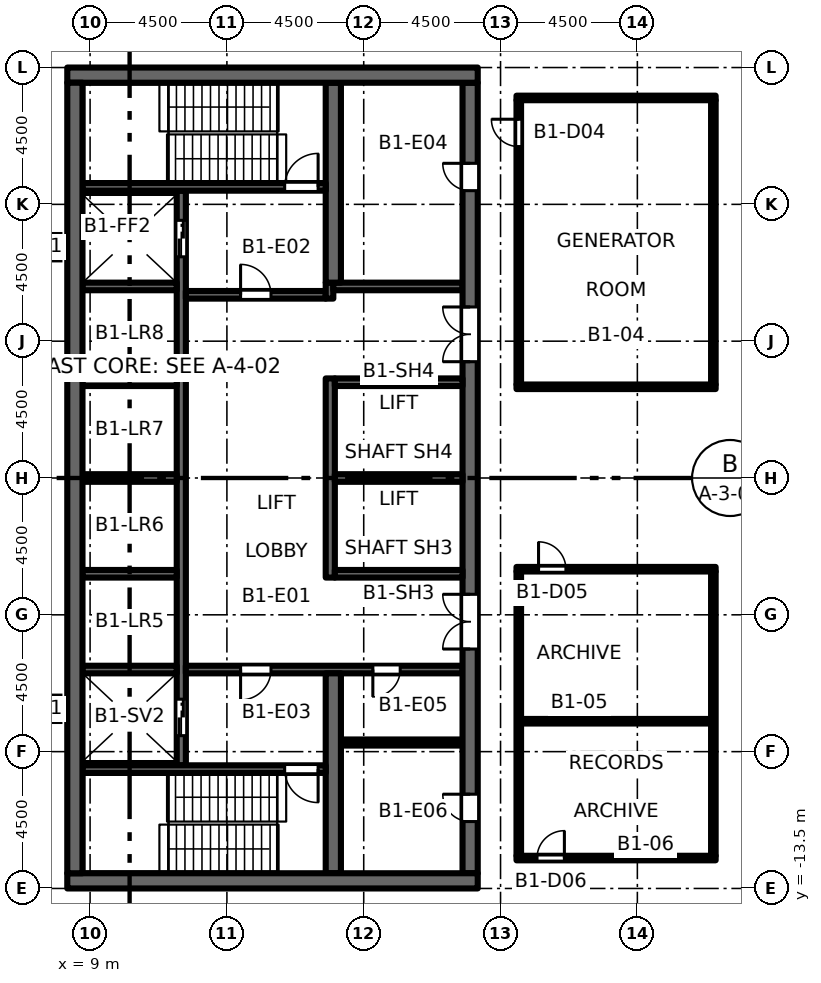
"""IFC4 building model, lengths in metres.
Left out: names, types, materials, properties, quantities, classifications, styles, units other than length and angle.
Written with IfcOpenShell. Run it as: python <this file> out.ifc"""

import sys

from ifc_helpers import new_model, si_unit, direction, frame, frame_2d, origin, origin_2d, place, context, subcontext, project, spatial, rectangle, hollow_rectangle, extrude, element, fill, save


model = new_model("IFC4")
c1 = context("Model", 3, precision=1e-05, world=origin(), true_north=direction((0.0, 1.0)))
c2 = subcontext(c1, "Body", "Model", "MODEL_VIEW")
j1 = project(units=[si_unit("LENGTHUNIT", "METRE"), si_unit("PLANEANGLEUNIT", "RADIAN")], contexts=[c1])
p1 = place(None, origin())
s1 = spatial("IfcSite", under=j1, at=p1, CompositionType="ELEMENT")
p2 = place(p1, origin())
s2 = spatial("IfcBuilding", under=s1, at=p2, CompositionType="ELEMENT")
p3 = place(p2, frame((0.0, 0.0, -5.0)))
s3 = spatial("IfcBuildingStorey", under=s2, at=p3, CompositionType="ELEMENT", Elevation=-5.0)
for number, where, z_axis, x_axis in (
    (1, (7.591, -7.591, 0.0), (0.0, 0.0, 1.0), (1.0, 0.0, 0.0)),
    (2, (7.591, 7.591, 0.0), (0.0, 0.0, 1.0), (1.0, 0.0, 0.0)),
):
    element("IfcColumn", number, at=place(p3, frame(where, z_axis=z_axis, x_axis=x_axis)), inside=s3, PredefinedType="COLUMN", context=c2, shape_type="SweptSolid", body=[
        extrude(hollow_rectangle(XDim=0.8, YDim=0.8, WallThickness=0.05, at=origin_2d()), origin(), (0.0, 0.0, 1.0), 5.0),
    ])
p4 = place(p3, frame((12.0, -9.45, 0.0), z_axis=(0.0, 0.0, 1.0), x_axis=(0.0, 1.0, 0.0)))
e3 = element("IfcWall", 3, at=p4, inside=s3, PredefinedType="SHEAR", context=c2, shape_type="SweptSolid", body=[
    extrude(rectangle(XDim=18.9, YDim=0.3, at=frame_2d((9.45, 0.0))), origin(), (0.0, 0.0, 1.0), 4.55),
])
p5 = place(p4, frame((16.725, 0.0, 0.0)))
e4 = element("IfcOpeningElement", 4, at=p5, cuts=e3, PredefinedType="OPENING", context=c2, shape_type="SweptSolid", body=[
    extrude(rectangle(XDim=1.2, YDim=2.1, at=frame_2d((0.6, 1.05))), frame((0.0, 0.16, 0.0), z_axis=(0.0, -1.0, 0.0), x_axis=(1.0, 0.0, 0.0)), (0.0, 0.0, 1.0), 0.32),
])
p6 = place(p4, frame((0.975, 0.0, 0.0)))
e5 = element("IfcOpeningElement", 5, at=p6, cuts=e3, PredefinedType="OPENING", context=c2, shape_type="SweptSolid", body=[
    extrude(rectangle(XDim=1.2, YDim=2.1, at=frame_2d((0.6, 1.05))), frame((0.0, 0.16, 0.0), z_axis=(0.0, -1.0, 0.0), x_axis=(1.0, 0.0, 0.0)), (0.0, 0.0, 1.0), 0.32),
])
p7 = place(p3, frame((12.15, 6.025, 0.0), z_axis=(0.0, 0.0, 1.0), x_axis=(1.0, 0.0, 0.0)))
e6 = element("IfcWall", 6, at=p7, inside=s3, PredefinedType="SHEAR", context=c2, shape_type="SweptSolid", body=[
    extrude(rectangle(XDim=4.6, YDim=0.25, at=frame_2d((2.3, 0.0))), origin(), (0.0, 0.0, 1.0), 4.55),
])
p8 = place(p7, frame((1.8, 0.0, 0.0)))
e7 = element("IfcOpeningElement", 7, at=p8, cuts=e6, PredefinedType="OPENING", context=c2, shape_type="SweptSolid", body=[
    extrude(rectangle(XDim=1.0, YDim=2.1, at=frame_2d((0.5, 1.05))), frame((0.0, 0.135, 0.0), z_axis=(0.0, -1.0, 0.0), x_axis=(1.0, 0.0, 0.0)), (0.0, 0.0, 1.0), 0.27),
])
p9 = place(p3, frame((16.875, 5.9, 0.0), z_axis=(0.0, 0.0, 1.0), x_axis=(0.0, 1.0, 0.0)))
e8 = element("IfcWall", 8, at=p9, inside=s3, PredefinedType="SHEAR", context=c2, shape_type="SweptSolid", body=[
    extrude(rectangle(XDim=0.525, YDim=0.25, at=frame_2d((0.263, 0.0))), origin(), (0.0, 0.0, 1.0), 4.55),
])
p10 = place(p3, frame((17.0, 6.3, 0.0), z_axis=(0.0, 0.0, 1.0), x_axis=(1.0, 0.0, 0.0)))
e9 = element("IfcWall", 9, at=p10, inside=s3, PredefinedType="SHEAR", context=c2, shape_type="SweptSolid", body=[
    extrude(rectangle(XDim=4.25, YDim=0.25, at=frame_2d((2.125, 0.0))), origin(), (0.0, 0.0, 1.0), 4.55),
])
p11 = place(p3, frame((12.15, -6.3, 0.0), z_axis=(0.0, 0.0, 1.0), x_axis=(1.0, 0.0, 0.0)))
e10 = element("IfcWall", 10, at=p11, inside=s3, PredefinedType="SHEAR", context=c2, shape_type="SweptSolid", body=[
    extrude(rectangle(XDim=9.1, YDim=0.25, at=frame_2d((4.55, 0.0))), origin(), (0.0, 0.0, 1.0), 4.55),
])
p12 = place(p11, frame((1.8, 0.0, 0.0)))
e11 = element("IfcOpeningElement", 11, at=p12, cuts=e10, PredefinedType="OPENING", context=c2, shape_type="SweptSolid", body=[
    extrude(rectangle(XDim=1.0, YDim=2.1, at=frame_2d((0.5, 1.05))), frame((0.0, 0.135, 0.0), z_axis=(0.0, -1.0, 0.0), x_axis=(1.0, 0.0, 0.0)), (0.0, 0.0, 1.0), 0.27),
])
p13 = place(p11, frame((6.15, 0.0, 0.0)))
e12 = element("IfcOpeningElement", 12, at=p13, cuts=e10, PredefinedType="OPENING", context=c2, shape_type="SweptSolid", body=[
    extrude(rectangle(XDim=0.9, YDim=2.1, at=frame_2d((0.45, 1.05))), frame((0.0, 0.135, 0.0), z_axis=(0.0, -1.0, 0.0), x_axis=(1.0, 0.0, 0.0)), (0.0, 0.0, 1.0), 0.27),
])
p14 = place(p3, frame((21.5, -13.0, 0.0), z_axis=(0.0, 0.0, 1.0), x_axis=(0.0, 1.0, 0.0)))
e13 = element("IfcWall", 13, at=p14, inside=s3, PredefinedType="SHEAR", context=c2, shape_type="SweptSolid", body=[
    extrude(rectangle(XDim=26.0, YDim=0.5, at=frame_2d((13.0, 0.0))), origin(), (0.0, 0.0, 1.0), 4.55),
])
p15 = place(p14, frame((16.825, 0.0, 0.0)))
e14 = element("IfcOpeningElement", 14, at=p15, cuts=e13, PredefinedType="OPENING", context=c2, shape_type="SweptSolid", body=[
    extrude(rectangle(XDim=1.8, YDim=2.1, at=frame_2d((0.9, 1.05))), frame((0.0, 0.26, 0.0), z_axis=(0.0, -1.0, 0.0), x_axis=(1.0, 0.0, 0.0)), (0.0, 0.0, 1.0), 0.52),
])
p16 = place(p14, frame((7.375, 0.0, 0.0)))
e15 = element("IfcOpeningElement", 15, at=p16, cuts=e13, PredefinedType="OPENING", context=c2, shape_type="SweptSolid", body=[
    extrude(rectangle(XDim=1.8, YDim=2.1, at=frame_2d((0.9, 1.05))), frame((0.0, 0.26, 0.0), z_axis=(0.0, -1.0, 0.0), x_axis=(1.0, 0.0, 0.0)), (0.0, 0.0, 1.0), 0.52),
])
p17 = place(p14, frame((22.45, 0.0, 0.0)))
e16 = element("IfcOpeningElement", 16, at=p17, cuts=e13, PredefinedType="OPENING", context=c2, shape_type="SweptSolid", body=[
    extrude(rectangle(XDim=0.9, YDim=2.1, at=frame_2d((0.45, 1.05))), frame((0.0, 0.26, 0.0), z_axis=(0.0, -1.0, 0.0), x_axis=(1.0, 0.0, 0.0)), (0.0, 0.0, 1.0), 0.52),
])
p18 = place(p14, frame((1.7, 0.0, 0.0)))
e17 = element("IfcOpeningElement", 17, at=p18, cuts=e13, PredefinedType="OPENING", context=c2, shape_type="SweptSolid", body=[
    extrude(rectangle(XDim=0.9, YDim=2.1, at=frame_2d((0.45, 1.05))), frame((0.0, 0.26, 0.0), z_axis=(0.0, -1.0, 0.0), x_axis=(1.0, 0.0, 0.0)), (0.0, 0.0, 1.0), 0.52),
])
p19 = place(p3, frame((17.25, -8.7, 0.0), z_axis=(0.0, 0.0, 1.0), x_axis=(1.0, 0.0, 0.0)))
e18 = element("IfcWall", 18, at=p19, inside=s3, PredefinedType="PARTITIONING", context=c2, shape_type="SweptSolid", body=[
    extrude(rectangle(XDim=4.0, YDim=0.2, at=frame_2d((2.0, 0.0))), origin(), (0.0, 0.0, 1.0), 4.55),
])
p20 = place(p3, frame((16.9, -3.275, 0.0), z_axis=(0.0, 0.0, 1.0), x_axis=(0.0, 1.0, 0.0)))
e19 = element("IfcWall", 19, at=p20, inside=s3, PredefinedType="SHEAR", context=c2, shape_type="SweptSolid", body=[
    extrude(rectangle(XDim=6.55, YDim=0.3, at=frame_2d((3.275, 0.0))), origin(), (0.0, 0.0, 1.0), 4.55),
])
for number, where, z_axis, x_axis in (
    (20, (17.05, 0.0, 0.0), (0.0, 0.0, 1.0), (1.0, 0.0, 0.0)),
    (21, (17.05, 3.15, 0.0), (0.0, 0.0, 1.0), (1.0, 0.0, 0.0)),
    (22, (17.05, -3.15, 0.0), (0.0, 0.0, 1.0), (1.0, 0.0, 0.0)),
):
    element("IfcWall", number, at=place(p3, frame(where, z_axis=z_axis, x_axis=x_axis)), inside=s3, PredefinedType="SHEAR", context=c2, shape_type="SweptSolid", body=[
        extrude(rectangle(XDim=4.2, YDim=0.25, at=frame_2d((2.1, 0.0))), origin(), (0.0, 0.0, 1.0), 4.55),
    ])
for number, where, z_axis, x_axis in (
    (23, (17.0, 6.425, 0.0), (0.0, 0.0, 1.0), (0.0, 1.0, 0.0)),
    (24, (17.0, -13.0, 0.0), (0.0, 0.0, 1.0), (0.0, 1.0, 0.0)),
):
    element("IfcWall", number, at=place(p3, frame(where, z_axis=z_axis, x_axis=x_axis)), inside=s3, PredefinedType="SHEAR", context=c2, shape_type="SweptSolid", body=[
        extrude(rectangle(XDim=6.575, YDim=0.5, at=frame_2d((3.288, 0.0))), origin(), (0.0, 0.0, 1.0), 4.55),
    ])
for number, where, z_axis, x_axis in (
    (25, (8.75, 0.0, 0.0), (0.0, 0.0, 1.0), (1.0, 0.0, 0.0)),
    (26, (8.75, 3.15, 0.0), (0.0, 0.0, 1.0), (1.0, 0.0, 0.0)),
    (27, (8.75, 6.3, 0.0), (0.0, 0.0, 1.0), (1.0, 0.0, 0.0)),
    (28, (8.75, -3.15, 0.0), (0.0, 0.0, 1.0), (1.0, 0.0, 0.0)),
    (29, (8.75, -6.3, 0.0), (0.0, 0.0, 1.0), (1.0, 0.0, 0.0)),
):
    element("IfcWall", number, at=place(p3, frame(where, z_axis=z_axis, x_axis=x_axis)), inside=s3, PredefinedType="SHEAR", context=c2, shape_type="SweptSolid", body=[
        extrude(rectangle(XDim=3.1, YDim=0.25, at=frame_2d((1.55, 0.0))), origin(), (0.0, 0.0, 1.0), 4.55),
    ])
p21 = place(p3, frame((8.75, 9.575, 0.0), z_axis=(0.0, 0.0, 1.0), x_axis=(1.0, 0.0, 0.0)))
e30 = element("IfcWall", 30, at=p21, inside=s3, PredefinedType="SHEAR", context=c2, shape_type="SweptSolid", body=[
    extrude(rectangle(XDim=8.0, YDim=0.25, at=frame_2d((4.0, 0.0))), origin(), (0.0, 0.0, 1.0), 4.55),
])
p22 = place(p21, frame((6.65, 0.0, 0.0)))
e31 = element("IfcOpeningElement", 31, at=p22, cuts=e30, PredefinedType="OPENING", context=c2, shape_type="SweptSolid", body=[
    extrude(rectangle(XDim=1.1, YDim=2.1, at=frame_2d((0.55, 1.05))), frame((0.0, 0.135, 0.0), z_axis=(0.0, -1.0, 0.0), x_axis=(1.0, 0.0, 0.0)), (0.0, 0.0, 1.0), 0.27),
])
p23 = place(p3, frame((8.75, -9.575, 0.0), z_axis=(0.0, 0.0, 1.0), x_axis=(1.0, 0.0, 0.0)))
e32 = element("IfcWall", 32, at=p23, inside=s3, PredefinedType="SHEAR", context=c2, shape_type="SweptSolid", body=[
    extrude(rectangle(XDim=8.0, YDim=0.25, at=frame_2d((4.0, 0.0))), origin(), (0.0, 0.0, 1.0), 4.55),
])
p24 = place(p23, frame((6.65, 0.0, 0.0)))
e33 = element("IfcOpeningElement", 33, at=p24, cuts=e32, PredefinedType="OPENING", context=c2, shape_type="SweptSolid", body=[
    extrude(rectangle(XDim=1.1, YDim=2.1, at=frame_2d((0.55, 1.05))), frame((0.0, 0.135, 0.0), z_axis=(0.0, -1.0, 0.0), x_axis=(1.0, 0.0, 0.0)), (0.0, 0.0, 1.0), 0.27),
])
for number, where, z_axis, x_axis in (
    (34, (8.25, 13.25, 0.0), (0.0, 0.0, 1.0), (1.0, 0.0, 0.0)),
    (35, (8.25, -13.25, 0.0), (0.0, 0.0, 1.0), (1.0, 0.0, 0.0)),
):
    element("IfcWall", number, at=place(p3, frame(where, z_axis=z_axis, x_axis=x_axis)), inside=s3, PredefinedType="SHEAR", context=c2, shape_type="SweptSolid", body=[
        extrude(rectangle(XDim=13.5, YDim=0.5, at=frame_2d((6.75, 0.0))), origin(), (0.0, 0.0, 1.0), 4.55),
    ])
p25 = place(p3, frame((8.5, -13.0, 0.0), z_axis=(0.0, 0.0, 1.0), x_axis=(0.0, 1.0, 0.0)))
e36 = element("IfcWall", 36, at=p25, inside=s3, PredefinedType="SHEAR", context=c2, shape_type="SweptSolid", body=[
    extrude(rectangle(XDim=26.0, YDim=0.5, at=frame_2d((13.0, 0.0))), origin(), (0.0, 0.0, 1.0), 4.55),
])
p26 = place(p3, frame((23.025, -12.5, 0.0), z_axis=(0.0, 0.0, 1.0), x_axis=(1.0, 0.0, 0.0)))
e37 = element("IfcWall", 37, at=p26, inside=s3, PredefinedType="PARTITIONING", context=c2, shape_type="SweptSolid", body=[
    extrude(rectangle(XDim=6.55, YDim=0.15, at=frame_2d((3.275, 0.0))), origin(), (0.0, 0.0, 1.0), 4.55),
])
p27 = place(p26, frame((0.675, 0.0, 0.0)))
e38 = element("IfcOpeningElement", 38, at=p27, cuts=e37, PredefinedType="OPENING", context=c2, shape_type="SweptSolid", body=[
    extrude(rectangle(XDim=0.9, YDim=2.1, at=frame_2d((0.45, 1.05))), frame((0.0, 0.085, 0.0), z_axis=(0.0, -1.0, 0.0), x_axis=(1.0, 0.0, 0.0)), (0.0, 0.0, 1.0), 0.17),
])
p28 = place(p3, frame((23.175, -8.0, 0.0), z_axis=(0.0, 0.0, 1.0), x_axis=(1.0, 0.0, 0.0)))
e39 = element("IfcWall", 39, at=p28, inside=s3, PredefinedType="PARTITIONING", context=c2, shape_type="SweptSolid", body=[
    extrude(rectangle(XDim=6.25, YDim=0.15, at=frame_2d((3.125, 0.0))), origin(), (0.0, 0.0, 1.0), 4.55),
])
p29 = place(p3, frame((23.025, -3.0, 0.0), z_axis=(0.0, 0.0, 1.0), x_axis=(1.0, 0.0, 0.0)))
e40 = element("IfcWall", 40, at=p29, inside=s3, PredefinedType="PARTITIONING", context=c2, shape_type="SweptSolid", body=[
    extrude(rectangle(XDim=6.55, YDim=0.15, at=frame_2d((3.275, 0.0))), origin(), (0.0, 0.0, 1.0), 4.55),
])
p30 = place(p29, frame((0.725, 0.0, 0.0)))
e41 = element("IfcOpeningElement", 41, at=p30, cuts=e40, PredefinedType="OPENING", context=c2, shape_type="SweptSolid", body=[
    extrude(rectangle(XDim=0.9, YDim=2.1, at=frame_2d((0.45, 1.05))), frame((0.0, 0.085, 0.0), z_axis=(0.0, -1.0, 0.0), x_axis=(1.0, 0.0, 0.0)), (0.0, 0.0, 1.0), 0.17),
])
for number, where, z_axis, x_axis in (
    (42, (23.025, 3.0, 0.0), (0.0, 0.0, 1.0), (1.0, 0.0, 0.0)),
    (43, (23.025, 12.5, 0.0), (0.0, 0.0, 1.0), (1.0, 0.0, 0.0)),
):
    element("IfcWall", number, at=place(p3, frame(where, z_axis=z_axis, x_axis=x_axis)), inside=s3, PredefinedType="PARTITIONING", context=c2, shape_type="SweptSolid", body=[
        extrude(rectangle(XDim=6.55, YDim=0.15, at=frame_2d((3.275, 0.0))), origin(), (0.0, 0.0, 1.0), 4.55),
    ])
p31 = place(p3, frame((23.1, -12.425, 0.0), z_axis=(0.0, 0.0, 1.0), x_axis=(0.0, 1.0, 0.0)))
e44 = element("IfcWall", 44, at=p31, inside=s3, PredefinedType="PARTITIONING", context=c2, shape_type="SweptSolid", body=[
    extrude(rectangle(XDim=9.35, YDim=0.15, at=frame_2d((4.675, 0.0))), origin(), (0.0, 0.0, 1.0), 4.55),
])
p32 = place(p3, frame((23.1, 3.075, 0.0), z_axis=(0.0, 0.0, 1.0), x_axis=(0.0, 1.0, 0.0)))
e45 = element("IfcWall", 45, at=p32, inside=s3, PredefinedType="PARTITIONING", context=c2, shape_type="SweptSolid", body=[
    extrude(rectangle(XDim=9.35, YDim=0.15, at=frame_2d((4.675, 0.0))), origin(), (0.0, 0.0, 1.0), 4.55),
])
p33 = place(p32, frame((7.825, 0.0, 0.0)))
e46 = element("IfcOpeningElement", 46, at=p33, cuts=e45, PredefinedType="OPENING", context=c2, shape_type="SweptSolid", body=[
    extrude(rectangle(XDim=0.9, YDim=2.1, at=frame_2d((0.45, 1.05))), frame((0.0, 0.085, 0.0), z_axis=(0.0, -1.0, 0.0), x_axis=(1.0, 0.0, 0.0)), (0.0, 0.0, 1.0), 0.17),
])
for number, where, z_axis, x_axis in (
    (47, (29.5, -12.425, 0.0), (0.0, 0.0, 1.0), (0.0, 1.0, 0.0)),
    (48, (29.5, 3.075, 0.0), (0.0, 0.0, 1.0), (0.0, 1.0, 0.0)),
):
    element("IfcWall", number, at=place(p3, frame(where, z_axis=z_axis, x_axis=x_axis)), inside=s3, PredefinedType="PARTITIONING", context=c2, shape_type="SweptSolid", body=[
        extrude(rectangle(XDim=9.35, YDim=0.15, at=frame_2d((4.675, 0.0))), origin(), (0.0, 0.0, 1.0), 4.55),
    ])
p34 = place(p8, origin())
e49 = element("IfcDoor", 49, at=p34, inside=s3, OperationType="SINGLE_SWING_RIGHT", PredefinedType="DOOR", context=c2, shape_type="SweptSolid", body=[
    extrude(rectangle(XDim=1.0, YDim=2.1, at=frame_2d((0.5, 1.05))), frame((0.0, 0.025, 0.0), z_axis=(0.0, -1.0, 0.0), x_axis=(1.0, 0.0, 0.0)), (0.0, 0.0, 1.0), 0.05),
])
fill(e7, e49)
p35 = place(p12, origin())
e50 = element("IfcDoor", 50, at=p35, inside=s3, OperationType="SINGLE_SWING_LEFT", PredefinedType="DOOR", context=c2, shape_type="SweptSolid", body=[
    extrude(rectangle(XDim=1.0, YDim=2.1, at=frame_2d((0.5, 1.05))), frame((0.0, 0.025, 0.0), z_axis=(0.0, -1.0, 0.0), x_axis=(1.0, 0.0, 0.0)), (0.0, 0.0, 1.0), 0.05),
])
fill(e11, e50)
p36 = place(p22, origin())
e51 = element("IfcDoor", 51, at=p36, inside=s3, OperationType="SINGLE_SWING_LEFT", PredefinedType="DOOR", context=c2, shape_type="SweptSolid", body=[
    extrude(rectangle(XDim=1.1, YDim=2.1, at=frame_2d((0.55, 1.05))), frame((0.0, 0.025, 0.0), z_axis=(0.0, -1.0, 0.0), x_axis=(1.0, 0.0, 0.0)), (0.0, 0.0, 1.0), 0.05),
])
fill(e31, e51)
p37 = place(p24, origin())
e52 = element("IfcDoor", 52, at=p37, inside=s3, OperationType="SINGLE_SWING_RIGHT", PredefinedType="DOOR", context=c2, shape_type="SweptSolid", body=[
    extrude(rectangle(XDim=1.1, YDim=2.1, at=frame_2d((0.55, 1.05))), frame((0.0, 0.025, 0.0), z_axis=(0.0, -1.0, 0.0), x_axis=(1.0, 0.0, 0.0)), (0.0, 0.0, 1.0), 0.05),
])
fill(e33, e52)
p38 = place(p15, origin())
e53 = element("IfcDoor", 53, at=p38, inside=s3, OperationType="DOUBLE_DOOR_DOUBLE_SWING", PredefinedType="DOOR", context=c2, shape_type="SweptSolid", body=[
    extrude(rectangle(XDim=1.8, YDim=2.1, at=frame_2d((0.9, 1.05))), frame((0.0, 0.025, 0.0), z_axis=(0.0, -1.0, 0.0), x_axis=(1.0, 0.0, 0.0)), (0.0, 0.0, 1.0), 0.05),
])
fill(e14, e53)
p39 = place(p16, origin())
e54 = element("IfcDoor", 54, at=p39, inside=s3, OperationType="DOUBLE_DOOR_DOUBLE_SWING", PredefinedType="DOOR", context=c2, shape_type="SweptSolid", body=[
    extrude(rectangle(XDim=1.8, YDim=2.1, at=frame_2d((0.9, 1.05))), frame((0.0, 0.025, 0.0), z_axis=(0.0, -1.0, 0.0), x_axis=(1.0, 0.0, 0.0)), (0.0, 0.0, 1.0), 0.05),
])
fill(e15, e54)
p40 = place(p5, origin())
e55 = element("IfcDoor", 55, at=p40, inside=s3, OperationType="DOUBLE_DOOR_SLIDING", PredefinedType="DOOR", context=c2, shape_type="SweptSolid", body=[
    extrude(rectangle(XDim=1.2, YDim=2.1, at=frame_2d((0.6, 1.05))), frame((0.0, 0.025, 0.0), z_axis=(0.0, -1.0, 0.0), x_axis=(1.0, 0.0, 0.0)), (0.0, 0.0, 1.0), 0.05),
])
fill(e4, e55)
p41 = place(p6, origin())
e56 = element("IfcDoor", 56, at=p41, inside=s3, OperationType="DOUBLE_DOOR_SLIDING", PredefinedType="DOOR", context=c2, shape_type="SweptSolid", body=[
    extrude(rectangle(XDim=1.2, YDim=2.1, at=frame_2d((0.6, 1.05))), frame((0.0, 0.025, 0.0), z_axis=(0.0, -1.0, 0.0), x_axis=(1.0, 0.0, 0.0)), (0.0, 0.0, 1.0), 0.05),
])
fill(e5, e56)
p42 = place(p17, origin())
e57 = element("IfcDoor", 57, at=p42, inside=s3, OperationType="SINGLE_SWING_LEFT", PredefinedType="DOOR", context=c2, shape_type="SweptSolid", body=[
    extrude(rectangle(XDim=0.9, YDim=2.1, at=frame_2d((0.45, 1.05))), frame((0.0, 0.025, 0.0), z_axis=(0.0, -1.0, 0.0), x_axis=(1.0, 0.0, 0.0)), (0.0, 0.0, 1.0), 0.05),
])
fill(e16, e57)
p43 = place(p13, origin())
e58 = element("IfcDoor", 58, at=p43, inside=s3, OperationType="SINGLE_SWING_LEFT", PredefinedType="DOOR", context=c2, shape_type="SweptSolid", body=[
    extrude(rectangle(XDim=0.9, YDim=2.1, at=frame_2d((0.45, 1.05))), frame((0.0, 0.025, 0.0), z_axis=(0.0, -1.0, 0.0), x_axis=(1.0, 0.0, 0.0)), (0.0, 0.0, 1.0), 0.05),
])
fill(e12, e58)
p44 = place(p18, origin())
e59 = element("IfcDoor", 59, at=p44, inside=s3, OperationType="SINGLE_SWING_LEFT", PredefinedType="DOOR", context=c2, shape_type="SweptSolid", body=[
    extrude(rectangle(XDim=0.9, YDim=2.1, at=frame_2d((0.45, 1.05))), frame((0.0, 0.025, 0.0), z_axis=(0.0, -1.0, 0.0), x_axis=(1.0, 0.0, 0.0)), (0.0, 0.0, 1.0), 0.05),
])
fill(e17, e59)
p45 = place(p33, origin())
e60 = element("IfcDoor", 60, at=p45, inside=s3, OperationType="SINGLE_SWING_RIGHT", PredefinedType="DOOR", context=c2, shape_type="SweptSolid", body=[
    extrude(rectangle(XDim=0.9, YDim=2.1, at=frame_2d((0.45, 1.05))), frame((0.0, 0.025, 0.0), z_axis=(0.0, -1.0, 0.0), x_axis=(1.0, 0.0, 0.0)), (0.0, 0.0, 1.0), 0.05),
])
fill(e46, e60)
p46 = place(p30, origin())
e61 = element("IfcDoor", 61, at=p46, inside=s3, OperationType="SINGLE_SWING_LEFT", PredefinedType="DOOR", context=c2, shape_type="SweptSolid", body=[
    extrude(rectangle(XDim=0.9, YDim=2.1, at=frame_2d((0.45, 1.05))), frame((0.0, 0.025, 0.0), z_axis=(0.0, -1.0, 0.0), x_axis=(1.0, 0.0, 0.0)), (0.0, 0.0, 1.0), 0.05),
])
fill(e41, e61)
p47 = place(p27, origin())
e62 = element("IfcDoor", 62, at=p47, inside=s3, OperationType="SINGLE_SWING_RIGHT", PredefinedType="DOOR", context=c2, shape_type="SweptSolid", body=[
    extrude(rectangle(XDim=0.9, YDim=2.1, at=frame_2d((0.45, 1.05))), frame((0.0, 0.025, 0.0), z_axis=(0.0, -1.0, 0.0), x_axis=(1.0, 0.0, 0.0)), (0.0, 0.0, 1.0), 0.05),
])
fill(e38, e62)
save(model, sys.argv[1])
